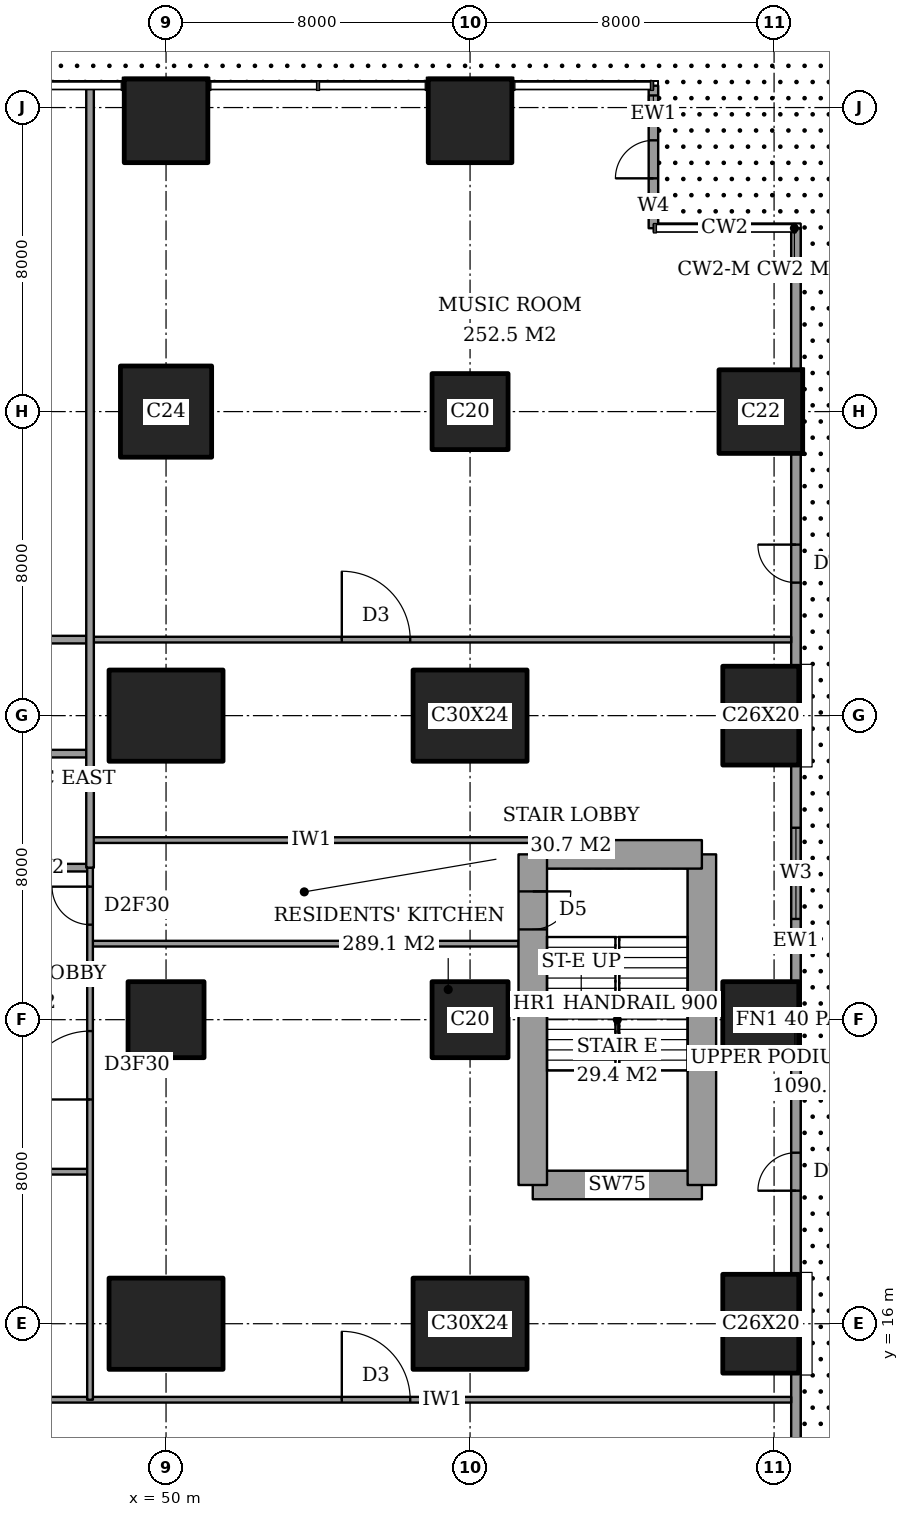
"""IFC4 building model, lengths in metres.
Left out: names, types, materials, properties, quantities, classifications, styles, units other than length and angle.
Written with IfcOpenShell. Run it as: python <this file> out.ifc"""

import sys

from ifc_helpers import new_model, si_unit, direction, frame, frame_2d, origin, origin_2d, place, context, subcontext, project, spatial, rectangle, extrude, element, fill, save


model = new_model("IFC4")
c1 = context("Model", 3, precision=1e-05, world=origin(), true_north=direction((0.0, 1.0)))
c2 = subcontext(c1, "Body", "Model", "MODEL_VIEW")
j1 = project(units=[si_unit("LENGTHUNIT", "METRE"), si_unit("PLANEANGLEUNIT", "RADIAN")], contexts=[c1])
p1 = place(None, origin())
s1 = spatial("IfcSite", under=j1, at=p1, CompositionType="ELEMENT")
p2 = place(p1, origin())
s2 = spatial("IfcBuilding", under=s1, at=p2, CompositionType="ELEMENT")
p3 = place(p2, frame((0.0, 0.0, 16.0)))
s3 = spatial("IfcBuildingStorey", under=s2, at=p3, CompositionType="ELEMENT", Elevation=16.0)
p4 = place(p3, frame((50.0, 16.0, 0.0), z_axis=(0.0, 0.0, 1.0), x_axis=(1.0, 0.0, 0.0)))
e1 = element("IfcColumn", 1, at=p4, inside=s3, PredefinedType="COLUMN", context=c2, shape_type="SweptSolid", body=[
    extrude(rectangle(XDim=3.0, YDim=2.4, at=origin_2d()), origin(), (0.0, 0.0, 1.0), 5.0),
])
p5 = place(p3, frame((50.0, 24.0, 0.0), z_axis=(0.0, 0.0, 1.0), x_axis=(1.0, 0.0, 0.0)))
e2 = element("IfcColumn", 2, at=p5, inside=s3, PredefinedType="COLUMN", context=c2, shape_type="SweptSolid", body=[
    extrude(rectangle(XDim=2.0, YDim=2.0, at=origin_2d()), origin(), (0.0, 0.0, 1.0), 5.0),
])
p6 = place(p3, frame((50.0, 32.0, 0.0), z_axis=(0.0, 0.0, 1.0), x_axis=(1.0, 0.0, 0.0)))
e3 = element("IfcColumn", 3, at=p6, inside=s3, PredefinedType="COLUMN", context=c2, shape_type="SweptSolid", body=[
    extrude(rectangle(XDim=3.0, YDim=2.4, at=origin_2d()), origin(), (0.0, 0.0, 1.0), 5.0),
])
p7 = place(p3, frame((50.0, 40.0, 0.0), z_axis=(0.0, 0.0, 1.0), x_axis=(1.0, 0.0, 0.0)))
e4 = element("IfcColumn", 4, at=p7, inside=s3, PredefinedType="COLUMN", context=c2, shape_type="SweptSolid", body=[
    extrude(rectangle(XDim=2.4, YDim=2.4, at=origin_2d()), origin(), (0.0, 0.0, 1.0), 5.0),
])
p8 = place(p3, frame((50.0, 47.65, 0.0), z_axis=(0.0, 0.0, 1.0), x_axis=(1.0, 0.0, 0.0)))
e5 = element("IfcColumn", 5, at=p8, inside=s3, PredefinedType="COLUMN", context=c2, shape_type="SweptSolid", body=[
    extrude(rectangle(XDim=2.2, YDim=2.2, at=origin_2d()), origin(), (0.0, 0.0, 1.0), 5.0),
])
p9 = place(p3, frame((58.0, 16.0, 0.0), z_axis=(0.0, 0.0, 1.0), x_axis=(1.0, 0.0, 0.0)))
e6 = element("IfcColumn", 6, at=p9, inside=s3, PredefinedType="COLUMN", context=c2, shape_type="SweptSolid", body=[
    extrude(rectangle(XDim=3.0, YDim=2.4, at=origin_2d()), origin(), (0.0, 0.0, 1.0), 5.0),
])
p10 = place(p3, frame((58.0, 24.0, 0.0), z_axis=(0.0, 0.0, 1.0), x_axis=(1.0, 0.0, 0.0)))
e7 = element("IfcColumn", 7, at=p10, inside=s3, PredefinedType="COLUMN", context=c2, shape_type="SweptSolid", body=[
    extrude(rectangle(XDim=2.0, YDim=2.0, at=origin_2d()), origin(), (0.0, 0.0, 1.0), 5.0),
])
p11 = place(p3, frame((58.0, 32.0, 0.0), z_axis=(0.0, 0.0, 1.0), x_axis=(1.0, 0.0, 0.0)))
e8 = element("IfcColumn", 8, at=p11, inside=s3, PredefinedType="COLUMN", context=c2, shape_type="SweptSolid", body=[
    extrude(rectangle(XDim=3.0, YDim=2.4, at=origin_2d()), origin(), (0.0, 0.0, 1.0), 5.0),
])
p12 = place(p3, frame((58.0, 40.0, 0.0), z_axis=(0.0, 0.0, 1.0), x_axis=(1.0, 0.0, 0.0)))
e9 = element("IfcColumn", 9, at=p12, inside=s3, PredefinedType="COLUMN", context=c2, shape_type="SweptSolid", body=[
    extrude(rectangle(XDim=2.0, YDim=2.0, at=origin_2d()), origin(), (0.0, 0.0, 1.0), 5.0),
])
p13 = place(p3, frame((58.0, 47.65, 0.0), z_axis=(0.0, 0.0, 1.0), x_axis=(1.0, 0.0, 0.0)))
e10 = element("IfcColumn", 10, at=p13, inside=s3, PredefinedType="COLUMN", context=c2, shape_type="SweptSolid", body=[
    extrude(rectangle(XDim=2.2, YDim=2.2, at=origin_2d()), origin(), (0.0, 0.0, 1.0), 5.0),
])
p14 = place(p3, frame((65.65, 16.0, 0.0), z_axis=(0.0, 0.0, 1.0), x_axis=(0.0, 1.0, 0.0)))
e11 = element("IfcColumn", 11, at=p14, inside=s3, PredefinedType="COLUMN", context=c2, shape_type="SweptSolid", body=[
    extrude(rectangle(XDim=2.6, YDim=2.0, at=origin_2d()), origin(), (0.0, 0.0, 1.0), 5.0),
])
p15 = place(p3, frame((65.65, 24.0, 0.0), z_axis=(0.0, 0.0, 1.0), x_axis=(1.0, 0.0, 0.0)))
e12 = element("IfcColumn", 12, at=p15, inside=s3, PredefinedType="COLUMN", context=c2, shape_type="SweptSolid", body=[
    extrude(rectangle(XDim=2.0, YDim=2.0, at=origin_2d()), origin(), (0.0, 0.0, 1.0), 5.0),
])
p16 = place(p3, frame((65.65, 32.0, 0.0), z_axis=(0.0, 0.0, 1.0), x_axis=(0.0, 1.0, 0.0)))
e13 = element("IfcColumn", 13, at=p16, inside=s3, PredefinedType="COLUMN", context=c2, shape_type="SweptSolid", body=[
    extrude(rectangle(XDim=2.6, YDim=2.0, at=origin_2d()), origin(), (0.0, 0.0, 1.0), 5.0),
])
p17 = place(p3, frame((65.65, 40.0, 0.0), z_axis=(0.0, 0.0, 1.0), x_axis=(1.0, 0.0, 0.0)))
e14 = element("IfcColumn", 14, at=p17, inside=s3, PredefinedType="COLUMN", context=c2, shape_type="SweptSolid", body=[
    extrude(rectangle(XDim=2.2, YDim=2.2, at=origin_2d()), origin(), (0.0, 0.0, 1.0), 5.0),
])
p18 = place(p3, frame((59.65, 19.65, 0.0), z_axis=(0.0, 0.0, 1.0), x_axis=(1.0, 0.0, 0.0)))
e15 = element("IfcWall", 15, at=p18, inside=s3, PredefinedType="SHEAR", context=c2, shape_type="SweptSolid", body=[
    extrude(rectangle(XDim=4.45, YDim=0.75, at=frame_2d((2.225, 0.0))), origin(), (0.0, 0.0, 1.0), 5.0),
])
p19 = place(p3, frame((64.1, 19.65, 0.0), z_axis=(0.0, 0.0, 1.0), x_axis=(0.0, 1.0, 0.0)))
e16 = element("IfcWall", 16, at=p19, inside=s3, PredefinedType="SHEAR", context=c2, shape_type="SweptSolid", body=[
    extrude(rectangle(XDim=8.7, YDim=0.75, at=frame_2d((4.35, 0.0))), origin(), (0.0, 0.0, 1.0), 5.0),
])
p20 = place(p3, frame((64.1, 28.35, 0.0), z_axis=(0.0, 0.0, 1.0), x_axis=(-1.0, 0.0, 0.0)))
e17 = element("IfcWall", 17, at=p20, inside=s3, PredefinedType="SHEAR", context=c2, shape_type="SweptSolid", body=[
    extrude(rectangle(XDim=4.45, YDim=0.75, at=frame_2d((2.225, 0.0))), origin(), (0.0, 0.0, 1.0), 5.0),
])
p21 = place(p3, frame((59.65, 28.35, 0.0), z_axis=(0.0, 0.0, 1.0), x_axis=(0.0, -1.0, 0.0)))
e18 = element("IfcWall", 18, at=p21, inside=s3, PredefinedType="SHEAR", context=c2, shape_type="SweptSolid", body=[
    extrude(rectangle(XDim=8.7, YDim=0.75, at=frame_2d((4.35, 0.0))), origin(), (0.0, 0.0, 1.0), 5.0),
])
p22 = place(p21, frame((0.975, 0.0, 0.0)))
e19 = element("IfcOpeningElement", 19, at=p22, cuts=e18, PredefinedType="OPENING", context=c2, shape_type="SweptSolid", body=[
    extrude(rectangle(XDim=1.0, YDim=2.1, at=frame_2d((0.5, 1.05))), frame((0.0, 0.385, 0.0), z_axis=(0.0, -1.0, 0.0), x_axis=(1.0, 0.0, 0.0)), (0.0, 0.0, 1.0), 0.77),
])
p23 = place(p3, frame((66.575, 3.175, 0.0), z_axis=(0.0, 0.0, 1.0), x_axis=(0.0, 1.0, 0.0)))
e20 = element("IfcWall", 20, at=p23, inside=s3, PredefinedType="SOLIDWALL", context=c2, shape_type="SweptSolid", body=[
    extrude(rectangle(XDim=41.65, YDim=0.25, at=frame_2d((20.825, 0.0))), origin(), (0.0, 0.0, 1.0), 5.0),
])
p24 = place(p23, frame((8.325, 0.0, 0.0)))
e21 = element("IfcOpeningElement", 21, at=p24, cuts=e20, PredefinedType="OPENING", context=c2, shape_type="SweptSolid", body=[
    extrude(rectangle(XDim=1.0, YDim=2.4, at=frame_2d((0.5, 1.2))), frame((0.0, 0.135, 0.0), z_axis=(0.0, -1.0, 0.0), x_axis=(1.0, 0.0, 0.0)), (0.0, 0.0, 1.0), 0.27),
])
p25 = place(p23, frame((16.325, 0.0, 0.0)))
e22 = element("IfcOpeningElement", 22, at=p25, cuts=e20, PredefinedType="OPENING", context=c2, shape_type="SweptSolid", body=[
    extrude(rectangle(XDim=1.0, YDim=2.4, at=frame_2d((0.5, 1.2))), frame((0.0, 0.135, 0.0), z_axis=(0.0, -1.0, 0.0), x_axis=(1.0, 0.0, 0.0)), (0.0, 0.0, 1.0), 0.27),
])
p26 = place(p23, frame((23.475, 0.0, 0.6)))
e23 = element("IfcOpeningElement", 23, at=p26, cuts=e20, PredefinedType="OPENING", context=c2, shape_type="SweptSolid", body=[
    extrude(rectangle(XDim=2.4, YDim=3.0, at=frame_2d((1.2, 1.5))), frame((0.0, 0.135, 0.0), z_axis=(0.0, -1.0, 0.0), x_axis=(1.0, 0.0, 0.0)), (0.0, 0.0, 1.0), 0.27),
])
p27 = place(p23, frame((32.325, 0.0, 0.0)))
e24 = element("IfcOpeningElement", 24, at=p27, cuts=e20, PredefinedType="OPENING", context=c2, shape_type="SweptSolid", body=[
    extrude(rectangle(XDim=1.0, YDim=2.4, at=frame_2d((0.5, 1.2))), frame((0.0, 0.135, 0.0), z_axis=(0.0, -1.0, 0.0), x_axis=(1.0, 0.0, 0.0)), (0.0, 0.0, 1.0), 0.27),
])
p28 = place(p3, frame((62.825, 44.825, 0.0), z_axis=(0.0, 0.0, 1.0), x_axis=(0.0, 1.0, 0.0)))
e25 = element("IfcWall", 25, at=p28, inside=s3, PredefinedType="SOLIDWALL", context=c2, shape_type="SweptSolid", body=[
    extrude(rectangle(XDim=3.75, YDim=0.25, at=frame_2d((1.875, 0.0))), origin(), (0.0, 0.0, 1.0), 5.0),
])
p29 = place(p28, frame((1.312, 0.0, 0.0)))
e26 = element("IfcOpeningElement", 26, at=p29, cuts=e25, PredefinedType="OPENING", context=c2, shape_type="SweptSolid", body=[
    extrude(rectangle(XDim=1.0, YDim=2.4, at=frame_2d((0.5, 1.2))), frame((0.0, 0.135, 0.0), z_axis=(0.0, -1.0, 0.0), x_axis=(1.0, 0.0, 0.0)), (0.0, 0.0, 1.0), 0.27),
])
p30 = place(p28, frame((0.281, 0.0, 0.6)))
e27 = element("IfcOpeningElement", 27, at=p30, cuts=e25, PredefinedType="OPENING", context=c2, shape_type="SweptSolid", body=[
    extrude(rectangle(XDim=0.6, YDim=3.0, at=frame_2d((0.3, 1.5))), frame((0.0, 0.135, 0.0), z_axis=(0.0, -1.0, 0.0), x_axis=(1.0, 0.0, 0.0)), (0.0, 0.0, 1.0), 0.27),
])
p31 = place(p28, frame((2.894, 0.0, 0.6)))
e28 = element("IfcOpeningElement", 28, at=p31, cuts=e25, PredefinedType="OPENING", context=c2, shape_type="SweptSolid", body=[
    extrude(rectangle(XDim=0.6, YDim=3.0, at=frame_2d((0.3, 1.5))), frame((0.0, 0.135, 0.0), z_axis=(0.0, -1.0, 0.0), x_axis=(1.0, 0.0, 0.0)), (0.0, 0.0, 1.0), 0.27),
])
p32 = place(p3, frame((43.5, 14.0, 0.0), z_axis=(0.0, 0.0, 1.0), x_axis=(1.0, 0.0, 0.0)))
e29 = element("IfcWall", 29, at=p32, inside=s3, PredefinedType="PARTITIONING", context=c2, shape_type="SweptSolid", body=[
    extrude(rectangle(XDim=22.95, YDim=0.15, at=frame_2d((11.475, 0.0))), origin(), (0.0, 0.0, 1.0), 4.7),
])
p33 = place(p32, frame((11.125, 0.0, 0.0)))
e30 = element("IfcOpeningElement", 30, at=p33, cuts=e29, PredefinedType="OPENING", context=c2, shape_type="SweptSolid", body=[
    extrude(rectangle(XDim=1.8, YDim=2.1, at=frame_2d((0.9, 1.05))), frame((0.0, 0.085, 0.0), z_axis=(0.0, -1.0, 0.0), x_axis=(1.0, 0.0, 0.0)), (0.0, 0.0, 1.0), 0.17),
])
p34 = place(p3, frame((42.0, 20.0, 0.0), z_axis=(0.0, 0.0, 1.0), x_axis=(1.0, 0.0, 0.0)))
e31 = element("IfcWall", 31, at=p34, inside=s3, PredefinedType="PARTITIONING", context=c2, shape_type="SweptSolid", body=[
    extrude(rectangle(XDim=6.0, YDim=0.15, at=frame_2d((3.0, 0.0))), origin(), (0.0, 0.0, 1.0), 4.7),
])
p35 = place(p34, frame((2.55, 0.0, 0.0)))
e32 = element("IfcOpeningElement", 32, at=p35, cuts=e31, PredefinedType="OPENING", context=c2, shape_type="SweptSolid", body=[
    extrude(rectangle(XDim=0.9, YDim=2.1, at=frame_2d((0.45, 1.05))), frame((0.0, 0.085, 0.0), z_axis=(0.0, -1.0, 0.0), x_axis=(1.0, 0.0, 0.0)), (0.0, 0.0, 1.0), 0.17),
])
p36 = place(p3, frame((48.0, 26.0, 0.0), z_axis=(0.0, 0.0, 1.0), x_axis=(1.0, 0.0, 0.0)))
e33 = element("IfcWall", 33, at=p36, inside=s3, PredefinedType="PARTITIONING", context=c2, shape_type="SweptSolid", body=[
    extrude(rectangle(XDim=11.275, YDim=0.15, at=frame_2d((5.637, 0.0))), origin(), (0.0, 0.0, 1.0), 4.7),
])
p37 = place(p3, frame((42.0, 28.0, 0.0), z_axis=(0.0, 0.0, 1.0), x_axis=(1.0, 0.0, 0.0)))
e34 = element("IfcWall", 34, at=p37, inside=s3, PredefinedType="PARTITIONING", context=c2, shape_type="SweptSolid", body=[
    extrude(rectangle(XDim=6.0, YDim=0.2, at=frame_2d((3.0, 0.0))), origin(), (0.0, 0.0, 1.0), 4.7),
])
p38 = place(p37, frame((2.55, 0.0, 0.0)))
e35 = element("IfcOpeningElement", 35, at=p38, cuts=e34, PredefinedType="OPENING", context=c2, shape_type="SweptSolid", body=[
    extrude(rectangle(XDim=0.9, YDim=2.1, at=frame_2d((0.45, 1.05))), frame((0.0, 0.11, 0.0), z_axis=(0.0, -1.0, 0.0), x_axis=(1.0, 0.0, 0.0)), (0.0, 0.0, 1.0), 0.22),
])
p39 = place(p3, frame((48.0, 28.725, 0.0), z_axis=(0.0, 0.0, 1.0), x_axis=(1.0, 0.0, 0.0)))
e36 = element("IfcWall", 36, at=p39, inside=s3, PredefinedType="PARTITIONING", context=c2, shape_type="SweptSolid", body=[
    extrude(rectangle(XDim=11.65, YDim=0.15, at=frame_2d((5.825, 0.0))), origin(), (0.0, 0.0, 1.0), 4.7),
])
p40 = place(p3, frame((42.0, 31.0, 0.0), z_axis=(0.0, 0.0, 1.0), x_axis=(1.0, 0.0, 0.0)))
e37 = element("IfcWall", 37, at=p40, inside=s3, PredefinedType="PARTITIONING", context=c2, shape_type="SweptSolid", body=[
    extrude(rectangle(XDim=6.0, YDim=0.2, at=frame_2d((3.0, 0.0))), origin(), (0.0, 0.0, 1.0), 4.7),
])
p41 = place(p40, frame((2.5, 0.0, 0.0)))
e38 = element("IfcOpeningElement", 38, at=p41, cuts=e37, PredefinedType="OPENING", context=c2, shape_type="SweptSolid", body=[
    extrude(rectangle(XDim=1.0, YDim=2.1, at=frame_2d((0.5, 1.05))), frame((0.0, 0.11, 0.0), z_axis=(0.0, -1.0, 0.0), x_axis=(1.0, 0.0, 0.0)), (0.0, 0.0, 1.0), 0.22),
])
p42 = place(p3, frame((42.0, 34.0, 0.0), z_axis=(0.0, 0.0, 1.0), x_axis=(1.0, 0.0, 0.0)))
e39 = element("IfcWall", 39, at=p42, inside=s3, PredefinedType="PARTITIONING", context=c2, shape_type="SweptSolid", body=[
    extrude(rectangle(XDim=6.0, YDim=0.2, at=frame_2d((3.0, 0.0))), origin(), (0.0, 0.0, 1.0), 4.7),
])
p43 = place(p3, frame((48.0, 34.0, 0.0), z_axis=(0.0, 0.0, 1.0), x_axis=(1.0, 0.0, 0.0)))
e40 = element("IfcWall", 40, at=p43, inside=s3, PredefinedType="PARTITIONING", context=c2, shape_type="SweptSolid", body=[
    extrude(rectangle(XDim=18.45, YDim=0.15, at=frame_2d((9.225, 0.0))), origin(), (0.0, 0.0, 1.0), 4.7),
])
p44 = place(p43, frame((6.625, 0.0, 0.0)))
e41 = element("IfcOpeningElement", 41, at=p44, cuts=e40, PredefinedType="OPENING", context=c2, shape_type="SweptSolid", body=[
    extrude(rectangle(XDim=1.8, YDim=2.1, at=frame_2d((0.9, 1.05))), frame((0.0, 0.085, 0.0), z_axis=(0.0, -1.0, 0.0), x_axis=(1.0, 0.0, 0.0)), (0.0, 0.0, 1.0), 0.17),
])
p45 = place(p3, frame((48.0, 28.0, 0.0), z_axis=(0.0, 0.0, 1.0), x_axis=(0.0, 1.0, 0.0)))
e42 = element("IfcWall", 42, at=p45, inside=s3, PredefinedType="PARTITIONING", context=c2, shape_type="SweptSolid", body=[
    extrude(rectangle(XDim=20.561, YDim=0.2, at=frame_2d((10.281, 0.0))), origin(), (0.0, 0.0, 1.0), 4.7),
])
p46 = place(p3, frame((48.0, 14.0, 0.0), z_axis=(0.0, 0.0, 1.0), x_axis=(0.0, 1.0, 0.0)))
e43 = element("IfcWall", 43, at=p46, inside=s3, PredefinedType="PARTITIONING", context=c2, shape_type="SweptSolid", body=[
    extrude(rectangle(XDim=14.0, YDim=0.15, at=frame_2d((7.0, 0.0))), origin(), (0.0, 0.0, 1.0), 4.7),
])
p47 = place(p46, frame((12.5, 0.0, 0.0)))
e44 = element("IfcOpeningElement", 44, at=p47, cuts=e43, PredefinedType="OPENING", context=c2, shape_type="SweptSolid", body=[
    extrude(rectangle(XDim=1.0, YDim=2.1, at=frame_2d((0.5, 1.05))), frame((0.0, 0.085, 0.0), z_axis=(0.0, -1.0, 0.0), x_axis=(1.0, 0.0, 0.0)), (0.0, 0.0, 1.0), 0.17),
])
p48 = place(p46, frame((7.9, 0.0, 0.0)))
e45 = element("IfcOpeningElement", 45, at=p48, cuts=e43, PredefinedType="OPENING", context=c2, shape_type="SweptSolid", body=[
    extrude(rectangle(XDim=1.8, YDim=2.1, at=frame_2d((0.9, 1.05))), frame((0.0, 0.085, 0.0), z_axis=(0.0, -1.0, 0.0), x_axis=(1.0, 0.0, 0.0)), (0.0, 0.0, 1.0), 0.17),
])
p49 = place(p25, origin())
e46 = element("IfcDoor", 46, at=p49, inside=s3, OperationType="SINGLE_SWING_RIGHT", PredefinedType="DOOR", context=c2, shape_type="SweptSolid", body=[
    extrude(rectangle(XDim=1.0, YDim=2.4, at=frame_2d((0.5, 1.2))), frame((0.0, 0.025, 0.0), z_axis=(0.0, -1.0, 0.0), x_axis=(1.0, 0.0, 0.0)), (0.0, 0.0, 1.0), 0.05),
])
fill(e22, e46)
p50 = place(p26, origin())
e47 = element("IfcWindow", 47, at=p50, inside=s3, PartitioningType="SINGLE_PANEL", PredefinedType="WINDOW", context=c2, shape_type="SweptSolid", body=[
    extrude(rectangle(XDim=2.4, YDim=3.0, at=frame_2d((1.2, 1.5))), frame((0.0, 0.03, 0.0), z_axis=(0.0, -1.0, 0.0), x_axis=(1.0, 0.0, 0.0)), (0.0, 0.0, 1.0), 0.06),
])
fill(e23, e47)
p51 = place(p27, origin())
e48 = element("IfcDoor", 48, at=p51, inside=s3, OperationType="SINGLE_SWING_LEFT", PredefinedType="DOOR", context=c2, shape_type="SweptSolid", body=[
    extrude(rectangle(XDim=1.0, YDim=2.4, at=frame_2d((0.5, 1.2))), frame((0.0, 0.025, 0.0), z_axis=(0.0, -1.0, 0.0), x_axis=(1.0, 0.0, 0.0)), (0.0, 0.0, 1.0), 0.05),
])
fill(e24, e48)
p52 = place(p29, origin())
e49 = element("IfcDoor", 49, at=p52, inside=s3, OperationType="SINGLE_SWING_RIGHT", PredefinedType="DOOR", context=c2, shape_type="SweptSolid", body=[
    extrude(rectangle(XDim=1.0, YDim=2.4, at=frame_2d((0.5, 1.2))), frame((0.0, 0.025, 0.0), z_axis=(0.0, -1.0, 0.0), x_axis=(1.0, 0.0, 0.0)), (0.0, 0.0, 1.0), 0.05),
])
fill(e26, e49)
p53 = place(p30, origin())
e50 = element("IfcWindow", 50, at=p53, inside=s3, PartitioningType="SINGLE_PANEL", PredefinedType="WINDOW", context=c2, shape_type="SweptSolid", body=[
    extrude(rectangle(XDim=0.6, YDim=3.0, at=frame_2d((0.3, 1.5))), frame((0.0, 0.03, 0.0), z_axis=(0.0, -1.0, 0.0), x_axis=(1.0, 0.0, 0.0)), (0.0, 0.0, 1.0), 0.06),
])
fill(e27, e50)
p54 = place(p31, origin())
e51 = element("IfcWindow", 51, at=p54, inside=s3, PartitioningType="SINGLE_PANEL", PredefinedType="WINDOW", context=c2, shape_type="SweptSolid", body=[
    extrude(rectangle(XDim=0.6, YDim=3.0, at=frame_2d((0.3, 1.5))), frame((0.0, 0.03, 0.0), z_axis=(0.0, -1.0, 0.0), x_axis=(1.0, 0.0, 0.0)), (0.0, 0.0, 1.0), 0.06),
])
fill(e28, e51)
p55 = place(p33, origin())
e52 = element("IfcDoor", 52, at=p55, inside=s3, OperationType="DOUBLE_DOOR_DOUBLE_SWING", PredefinedType="DOOR", context=c2, shape_type="SweptSolid", body=[
    extrude(rectangle(XDim=1.8, YDim=2.1, at=frame_2d((0.9, 1.05))), frame((0.0, 0.025, 0.0), z_axis=(0.0, -1.0, 0.0), x_axis=(1.0, 0.0, 0.0)), (0.0, 0.0, 1.0), 0.05),
])
fill(e30, e52)
p56 = place(p44, origin())
e53 = element("IfcDoor", 53, at=p56, inside=s3, OperationType="DOUBLE_DOOR_DOUBLE_SWING", PredefinedType="DOOR", context=c2, shape_type="SweptSolid", body=[
    extrude(rectangle(XDim=1.8, YDim=2.1, at=frame_2d((0.9, 1.05))), frame((0.0, 0.025, 0.0), z_axis=(0.0, -1.0, 0.0), x_axis=(1.0, 0.0, 0.0)), (0.0, 0.0, 1.0), 0.05),
])
fill(e41, e53)
p57 = place(p47, origin())
e54 = element("IfcDoor", 54, at=p57, inside=s3, OperationType="SINGLE_SWING_LEFT", PredefinedType="DOOR", context=c2, shape_type="SweptSolid", body=[
    extrude(rectangle(XDim=1.0, YDim=2.1, at=frame_2d((0.5, 1.05))), frame((0.0, 0.025, 0.0), z_axis=(0.0, -1.0, 0.0), x_axis=(1.0, 0.0, 0.0)), (0.0, 0.0, 1.0), 0.05),
])
fill(e44, e54)
p58 = place(p48, origin())
e55 = element("IfcDoor", 55, at=p58, inside=s3, OperationType="DOUBLE_DOOR_DOUBLE_SWING", PredefinedType="DOOR", context=c2, shape_type="SweptSolid", body=[
    extrude(rectangle(XDim=1.8, YDim=2.1, at=frame_2d((0.9, 1.05))), frame((0.0, 0.025, 0.0), z_axis=(0.0, -1.0, 0.0), x_axis=(1.0, 0.0, 0.0)), (0.0, 0.0, 1.0), 0.05),
])
fill(e45, e55)
p59 = place(p22, origin())
e56 = element("IfcDoor", 56, at=p59, inside=s3, OperationType="SINGLE_SWING_RIGHT", PredefinedType="DOOR", context=c2, shape_type="SweptSolid", body=[
    extrude(rectangle(XDim=1.0, YDim=2.1, at=frame_2d((0.5, 1.05))), frame((0.0, 0.025, 0.0), z_axis=(0.0, -1.0, 0.0), x_axis=(1.0, 0.0, 0.0)), (0.0, 0.0, 1.0), 0.05),
])
fill(e19, e56)
save(model, sys.argv[1])
